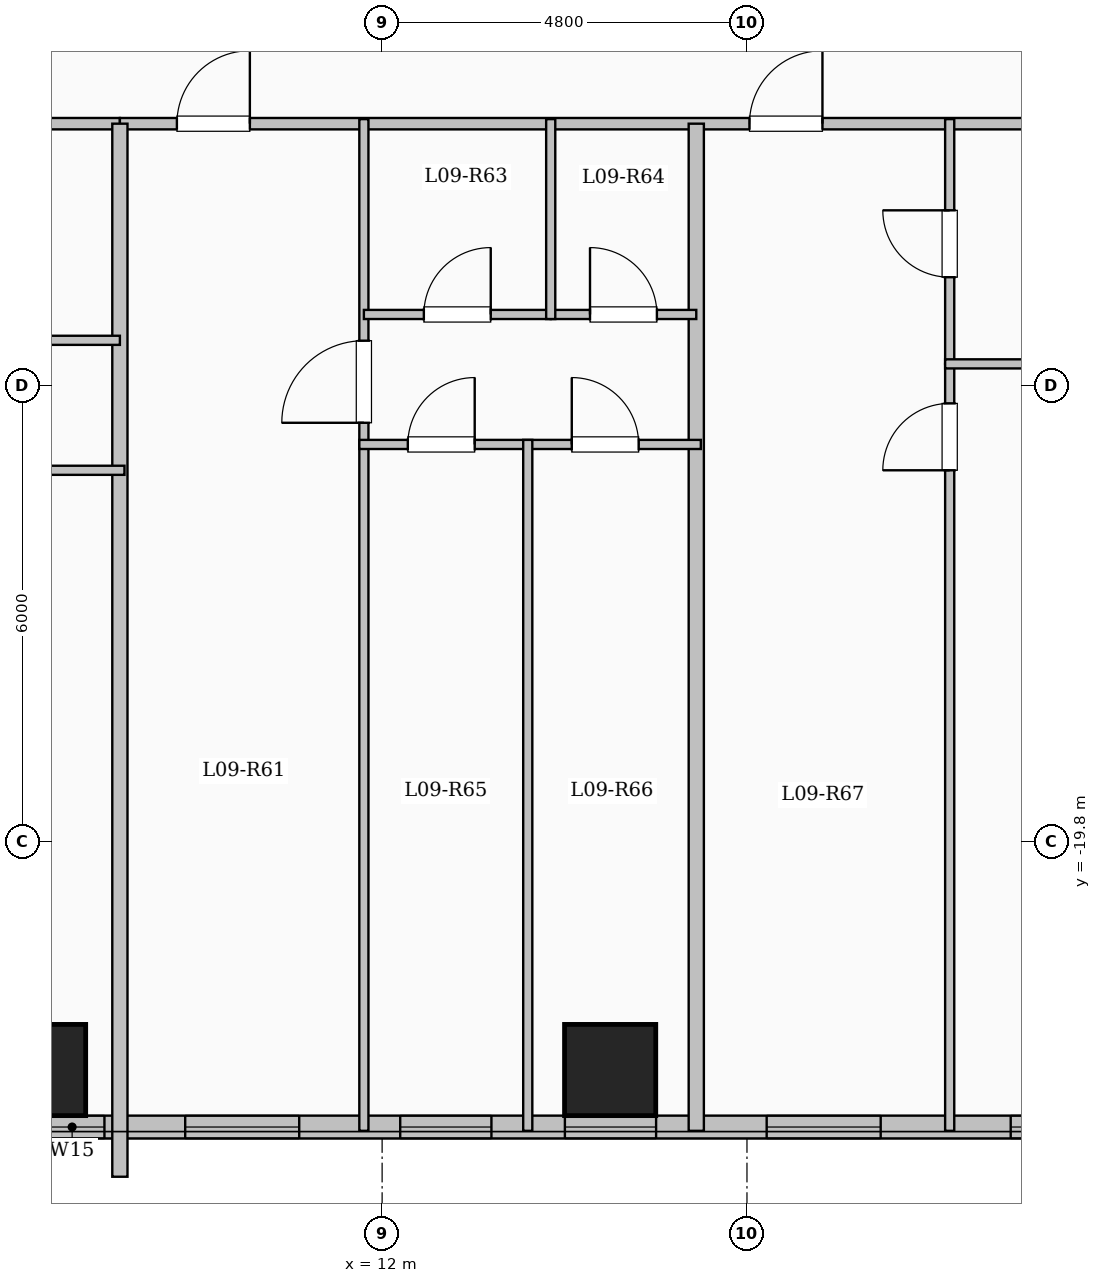
"""IFC4 building model, lengths in metres.
Left out: names, types, materials, properties, quantities, classifications, styles, units other than length and angle.
Written with IfcOpenShell. Run it as: python <this file> out.ifc"""

import sys

from ifc_helpers import new_model, si_unit, direction, frame, frame_2d, origin, origin_2d, place, context, subcontext, project, spatial, rectangle, extrude, element, fill, save


model = new_model("IFC4")
c1 = context("Model", 3, precision=1e-05, world=origin(), true_north=direction((0.0, 1.0)))
c2 = subcontext(c1, "Body", "Model", "MODEL_VIEW")
j1 = project(units=[si_unit("LENGTHUNIT", "METRE"), si_unit("PLANEANGLEUNIT", "RADIAN")], contexts=[c1])
p1 = place(None, origin())
s1 = spatial("IfcSite", under=j1, at=p1, CompositionType="ELEMENT")
p2 = place(p1, origin())
s2 = spatial("IfcBuilding", under=s1, at=p2, CompositionType="ELEMENT")
p3 = place(p2, frame((0.0, 0.0, 37.4)))
s3 = spatial("IfcBuildingStorey", under=s2, at=p3, CompositionType="ELEMENT", Elevation=37.4)
for number, where, z_axis, x_axis in (
    (1, (7.5, -22.8, 0.0), (0.0, 0.0, 1.0), (1.0, 0.0, 0.0)),
    (2, (15.0, -22.8, 0.0), (0.0, 0.0, 1.0), (1.0, 0.0, 0.0)),
):
    element("IfcColumn", number, at=place(p3, frame(where, z_axis=z_axis, x_axis=x_axis)), inside=s3, PredefinedType="COLUMN", context=c2, shape_type="SweptSolid", body=[
        extrude(rectangle(XDim=1.2, YDim=1.2, at=origin_2d()), origin(), (0.0, 0.0, 1.0), 3.35),
    ])
p4 = place(p3, frame((22.65, -23.55, 0.0), z_axis=(0.0, 0.0, 1.0), x_axis=(-1.0, 0.0, 0.0)))
e3 = element("IfcWall", 3, at=p4, inside=s3, PredefinedType="SOLIDWALL", context=c2, shape_type="SweptSolid", body=[
    extrude(rectangle(XDim=15.3, YDim=0.3, at=frame_2d((7.65, 0.0))), origin(), (0.0, 0.0, 1.0), 3.1),
])
p5 = place(p4, frame((0.88, 0.0, 0.9)))
e4 = element("IfcOpeningElement", 4, at=p5, cuts=e3, PredefinedType="OPENING", context=c2, shape_type="SweptSolid", body=[
    extrude(rectangle(XDim=1.5, YDim=1.65, at=frame_2d((0.75, 0.825))), frame((0.0, 0.16, 0.0), z_axis=(0.0, -1.0, 0.0), x_axis=(1.0, 0.0, 0.0)), (0.0, 0.0, 1.0), 0.32),
])
p6 = place(p4, frame((4.091, 0.0, 0.9)))
e5 = element("IfcOpeningElement", 5, at=p6, cuts=e3, PredefinedType="OPENING", context=c2, shape_type="SweptSolid", body=[
    extrude(rectangle(XDim=1.5, YDim=1.65, at=frame_2d((0.75, 0.825))), frame((0.0, 0.16, 0.0), z_axis=(0.0, -1.0, 0.0), x_axis=(1.0, 0.0, 0.0)), (0.0, 0.0, 1.0), 0.32),
])
p7 = place(p4, frame((7.045, 0.0, 0.95)))
e6 = element("IfcOpeningElement", 6, at=p7, cuts=e3, PredefinedType="OPENING", context=c2, shape_type="SweptSolid", body=[
    extrude(rectangle(XDim=1.2, YDim=1.5, at=frame_2d((0.6, 0.75))), frame((0.0, 0.16, 0.0), z_axis=(0.0, -1.0, 0.0), x_axis=(1.0, 0.0, 0.0)), (0.0, 0.0, 1.0), 0.32),
])
p8 = place(p4, frame((9.212, 0.0, 0.95)))
e7 = element("IfcOpeningElement", 7, at=p8, cuts=e3, PredefinedType="OPENING", context=c2, shape_type="SweptSolid", body=[
    extrude(rectangle(XDim=1.2, YDim=1.5, at=frame_2d((0.6, 0.75))), frame((0.0, 0.16, 0.0), z_axis=(0.0, -1.0, 0.0), x_axis=(1.0, 0.0, 0.0)), (0.0, 0.0, 1.0), 0.32),
])
p9 = place(p4, frame((11.741, 0.0, 0.9)))
e8 = element("IfcOpeningElement", 8, at=p9, cuts=e3, PredefinedType="OPENING", context=c2, shape_type="SweptSolid", body=[
    extrude(rectangle(XDim=1.5, YDim=1.65, at=frame_2d((0.75, 0.825))), frame((0.0, 0.16, 0.0), z_axis=(0.0, -1.0, 0.0), x_axis=(1.0, 0.0, 0.0)), (0.0, 0.0, 1.0), 0.32),
])
p10 = place(p4, frame((14.303, 0.0, 0.95)))
e9 = element("IfcOpeningElement", 9, at=p10, cuts=e3, PredefinedType="OPENING", context=c2, shape_type="SweptSolid", body=[
    extrude(rectangle(XDim=0.85, YDim=1.5, at=frame_2d((0.425, 0.75))), frame((0.0, 0.16, 0.0), z_axis=(0.0, -1.0, 0.0), x_axis=(1.0, 0.0, 0.0)), (0.0, 0.0, 1.0), 0.32),
])
p11 = place(p3, frame((-8.55, -10.35, 0.0), z_axis=(0.0, 0.0, 1.0), x_axis=(1.0, 0.0, 0.0)))
e10 = element("IfcWall", 10, at=p11, inside=s3, PredefinedType="PARTITIONING", context=c2, shape_type="SweptSolid", body=[
    extrude(rectangle(XDim=17.1, YDim=0.15, at=frame_2d((8.55, 0.0))), origin(), (0.0, 0.0, 1.0), 3.1),
])
p12 = place(p11, frame((0.8, 0.0, 0.0)))
e11 = element("IfcOpeningElement", 11, at=p12, cuts=e10, PredefinedType="OPENING", context=c2, shape_type="SweptSolid", body=[
    extrude(rectangle(XDim=0.96, YDim=2.15, at=frame_2d((0.48, 1.075))), frame((0.0, 0.085, 0.0), z_axis=(0.0, -1.0, 0.0), x_axis=(1.0, 0.0, 0.0)), (0.0, 0.0, 1.0), 0.17),
])
p13 = place(p3, frame((8.55, -10.35, 0.0), z_axis=(0.0, 0.0, 1.0), x_axis=(1.0, 0.0, 0.0)))
e12 = element("IfcWall", 12, at=p13, inside=s3, PredefinedType="PARTITIONING", context=c2, shape_type="SweptSolid", body=[
    extrude(rectangle(XDim=14.0, YDim=0.15, at=frame_2d((7.0, 0.0))), origin(), (0.0, 0.0, 1.0), 3.1),
])
p14 = place(p13, frame((0.75, 0.0, 0.0)))
e13 = element("IfcOpeningElement", 13, at=p14, cuts=e12, PredefinedType="OPENING", context=c2, shape_type="SweptSolid", body=[
    extrude(rectangle(XDim=0.96, YDim=2.15, at=frame_2d((0.48, 1.075))), frame((0.0, 0.085, 0.0), z_axis=(0.0, -1.0, 0.0), x_axis=(1.0, 0.0, 0.0)), (0.0, 0.0, 1.0), 0.17),
])
p15 = place(p13, frame((8.283, 0.0, 0.0)))
e14 = element("IfcOpeningElement", 14, at=p15, cuts=e12, PredefinedType="OPENING", context=c2, shape_type="SweptSolid", body=[
    extrude(rectangle(XDim=0.96, YDim=2.15, at=frame_2d((0.48, 1.075))), frame((0.0, 0.085, 0.0), z_axis=(0.0, -1.0, 0.0), x_axis=(1.0, 0.0, 0.0)), (0.0, 0.0, 1.0), 0.17),
])
p16 = place(p3, frame((16.133, -23.6, 0.0), z_axis=(0.0, 0.0, 1.0), x_axis=(0.0, 1.0, 0.0)))
e15 = element("IfcWall", 15, at=p16, inside=s3, PredefinedType="SOLIDWALL", context=c2, shape_type="SweptSolid", body=[
    extrude(rectangle(XDim=13.25, YDim=0.2, at=frame_2d((6.625, 0.0))), origin(), (0.0, 0.0, 1.0), 3.1),
])
p17 = place(p3, frame((11.76, -23.6, 0.0), z_axis=(0.0, 0.0, 1.0), x_axis=(0.0, 1.0, 0.0)))
e16 = element("IfcWall", 16, at=p17, inside=s3, PredefinedType="PARTITIONING", context=c2, shape_type="SweptSolid", body=[
    extrude(rectangle(XDim=13.31, YDim=0.12, at=frame_2d((6.655, 0.0))), origin(), (0.0, 0.0, 1.0), 3.1),
])
p18 = place(p17, frame((9.315, 0.0, 0.0)))
e17 = element("IfcOpeningElement", 17, at=p18, cuts=e16, PredefinedType="OPENING", context=c2, shape_type="SweptSolid", body=[
    extrude(rectangle(XDim=1.08, YDim=2.15, at=frame_2d((0.54, 1.075))), frame((0.0, 0.07, 0.0), z_axis=(0.0, -1.0, 0.0), x_axis=(1.0, 0.0, 0.0)), (0.0, 0.0, 1.0), 0.14),
])
p19 = place(p3, frame((11.76, -12.86, 0.0), z_axis=(0.0, 0.0, 1.0), x_axis=(1.0, 0.0, 0.0)))
e18 = element("IfcWall", 18, at=p19, inside=s3, PredefinedType="PARTITIONING", context=c2, shape_type="SweptSolid", body=[
    extrude(rectangle(XDim=2.458, YDim=0.12, at=frame_2d((1.229, 0.0))), origin(), (0.0, 0.0, 1.0), 2.585),
])
p20 = place(p19, frame((0.789, 0.0, 0.0)))
e19 = element("IfcOpeningElement", 19, at=p20, cuts=e18, PredefinedType="OPENING", context=c2, shape_type="SweptSolid", body=[
    extrude(rectangle(XDim=0.88, YDim=2.1, at=frame_2d((0.44, 1.05))), frame((0.0, 0.07, 0.0), z_axis=(0.0, -1.0, 0.0), x_axis=(1.0, 0.0, 0.0)), (0.0, 0.0, 1.0), 0.14),
])
p21 = place(p3, frame((14.218, -12.86, 0.0), z_axis=(0.0, 0.0, 1.0), x_axis=(1.0, 0.0, 0.0)))
e20 = element("IfcWall", 20, at=p21, inside=s3, PredefinedType="PARTITIONING", context=c2, shape_type="SweptSolid", body=[
    extrude(rectangle(XDim=1.915, YDim=0.12, at=frame_2d((0.958, 0.0))), origin(), (0.0, 0.0, 1.0), 2.585),
])
p22 = place(p21, frame((0.517, 0.0, 0.0)))
e21 = element("IfcOpeningElement", 21, at=p22, cuts=e20, PredefinedType="OPENING", context=c2, shape_type="SweptSolid", body=[
    extrude(rectangle(XDim=0.88, YDim=2.1, at=frame_2d((0.44, 1.05))), frame((0.0, 0.07, 0.0), z_axis=(0.0, -1.0, 0.0), x_axis=(1.0, 0.0, 0.0)), (0.0, 0.0, 1.0), 0.14),
])
p23 = place(p3, frame((11.7, -14.57, 0.0), z_axis=(0.0, 0.0, 1.0), x_axis=(1.0, 0.0, 0.0)))
e22 = element("IfcWall", 22, at=p23, inside=s3, PredefinedType="PARTITIONING", context=c2, shape_type="SweptSolid", body=[
    extrude(rectangle(XDim=4.493, YDim=0.12, at=frame_2d((2.247, 0.0))), origin(), (0.0, 0.0, 1.0), 3.1),
])
p24 = place(p23, frame((0.638, 0.0, 0.0)))
e23 = element("IfcOpeningElement", 23, at=p24, cuts=e22, PredefinedType="OPENING", context=c2, shape_type="SweptSolid", body=[
    extrude(rectangle(XDim=0.88, YDim=2.1, at=frame_2d((0.44, 1.05))), frame((0.0, 0.07, 0.0), z_axis=(0.0, -1.0, 0.0), x_axis=(1.0, 0.0, 0.0)), (0.0, 0.0, 1.0), 0.14),
])
p25 = place(p23, frame((2.795, 0.0, 0.0)))
e24 = element("IfcOpeningElement", 24, at=p25, cuts=e22, PredefinedType="OPENING", context=c2, shape_type="SweptSolid", body=[
    extrude(rectangle(XDim=0.88, YDim=2.1, at=frame_2d((0.44, 1.05))), frame((0.0, 0.07, 0.0), z_axis=(0.0, -1.0, 0.0), x_axis=(1.0, 0.0, 0.0)), (0.0, 0.0, 1.0), 0.14),
])
p26 = place(p3, frame((14.218, -12.92, 0.0), z_axis=(0.0, 0.0, 1.0), x_axis=(0.0, 1.0, 0.0)))
e25 = element("IfcWall", 25, at=p26, inside=s3, PredefinedType="PARTITIONING", context=c2, shape_type="SweptSolid", body=[
    extrude(rectangle(XDim=2.63, YDim=0.12, at=frame_2d((1.315, 0.0))), origin(), (0.0, 0.0, 1.0), 3.1),
])
p27 = place(p3, frame((13.916, -23.6, 0.0), z_axis=(0.0, 0.0, 1.0), x_axis=(0.0, 1.0, 0.0)))
e26 = element("IfcWall", 26, at=p27, inside=s3, PredefinedType="PARTITIONING", context=c2, shape_type="SweptSolid", body=[
    extrude(rectangle(XDim=9.09, YDim=0.12, at=frame_2d((4.545, 0.0))), origin(), (0.0, 0.0, 1.0), 3.1),
])
p28 = place(p3, frame((19.467, -23.6, 0.0), z_axis=(0.0, 0.0, 1.0), x_axis=(0.0, 1.0, 0.0)))
e27 = element("IfcWall", 27, at=p28, inside=s3, PredefinedType="PARTITIONING", context=c2, shape_type="SweptSolid", body=[
    extrude(rectangle(XDim=10.09, YDim=0.12, at=frame_2d((5.045, 0.0))), origin(), (0.0, 0.0, 1.0), 3.1),
])
p29 = place(p28, frame((8.69, 0.0, 0.0)))
e28 = element("IfcOpeningElement", 28, at=p29, cuts=e27, PredefinedType="OPENING", context=c2, shape_type="SweptSolid", body=[
    extrude(rectangle(XDim=0.88, YDim=2.1, at=frame_2d((0.44, 1.05))), frame((0.0, 0.07, 0.0), z_axis=(0.0, -1.0, 0.0), x_axis=(1.0, 0.0, 0.0)), (0.0, 0.0, 1.0), 0.14),
])
p30 = place(p3, frame((19.467, -13.51, 0.0), z_axis=(0.0, 0.0, 1.0), x_axis=(0.0, 1.0, 0.0)))
e29 = element("IfcWall", 29, at=p30, inside=s3, PredefinedType="PARTITIONING", context=c2, shape_type="SweptSolid", body=[
    extrude(rectangle(XDim=3.22, YDim=0.12, at=frame_2d((1.61, 0.0))), origin(), (0.0, 0.0, 1.0), 3.1),
])
p31 = place(p30, frame((1.14, 0.0, 0.0)))
e30 = element("IfcOpeningElement", 30, at=p31, cuts=e29, PredefinedType="OPENING", context=c2, shape_type="SweptSolid", body=[
    extrude(rectangle(XDim=0.88, YDim=2.1, at=frame_2d((0.44, 1.05))), frame((0.0, 0.07, 0.0), z_axis=(0.0, -1.0, 0.0), x_axis=(1.0, 0.0, 0.0)), (0.0, 0.0, 1.0), 0.14),
])
p32 = place(p3, frame((19.407, -13.51, 0.0), z_axis=(0.0, 0.0, 1.0), x_axis=(1.0, 0.0, 0.0)))
e31 = element("IfcWall", 31, at=p32, inside=s3, PredefinedType="PARTITIONING", context=c2, shape_type="SweptSolid", body=[
    extrude(rectangle(XDim=3.203, YDim=0.12, at=frame_2d((1.602, 0.0))), origin(), (0.0, 0.0, 1.0), 3.1),
])
p33 = place(p3, frame((8.55, -24.204, 0.0), z_axis=(0.0, 0.0, 1.0), x_axis=(0.0, 1.0, 0.0)))
e32 = element("IfcWall", 32, at=p33, inside=s3, PredefinedType="SOLIDWALL", context=c2, shape_type="SweptSolid", body=[
    extrude(rectangle(XDim=13.854, YDim=0.2, at=frame_2d((6.927, 0.0))), origin(), (0.0, 0.0, 1.0), 3.1),
])
p34 = place(p3, frame((3.223, -13.2, 0.0), z_axis=(0.0, 0.0, 1.0), x_axis=(1.0, 0.0, 0.0)))
e33 = element("IfcWall", 33, at=p34, inside=s3, PredefinedType="PARTITIONING", context=c2, shape_type="SweptSolid", body=[
    extrude(rectangle(XDim=5.327, YDim=0.12, at=frame_2d((2.664, 0.0))), origin(), (0.0, 0.0, 1.0), 3.1),
])
p35 = place(p34, frame((2.224, 0.0, 0.0)))
e34 = element("IfcOpeningElement", 34, at=p35, cuts=e33, PredefinedType="OPENING", context=c2, shape_type="SweptSolid", body=[
    extrude(rectangle(XDim=0.88, YDim=2.1, at=frame_2d((0.44, 1.05))), frame((0.0, 0.07, 0.0), z_axis=(0.0, -1.0, 0.0), x_axis=(1.0, 0.0, 0.0)), (0.0, 0.0, 1.0), 0.14),
])
p36 = place(p3, frame((-2.777, -14.91, 0.0), z_axis=(0.0, 0.0, 1.0), x_axis=(1.0, 0.0, 0.0)))
e35 = element("IfcWall", 35, at=p36, inside=s3, PredefinedType="PARTITIONING", context=c2, shape_type="SweptSolid", body=[
    extrude(rectangle(XDim=11.387, YDim=0.12, at=frame_2d((5.694, 0.0))), origin(), (0.0, 0.0, 1.0), 2.585),
])
p37 = place(p36, frame((1.428, 0.0, 0.0)))
e36 = element("IfcOpeningElement", 36, at=p37, cuts=e35, PredefinedType="OPENING", context=c2, shape_type="SweptSolid", body=[
    extrude(rectangle(XDim=0.88, YDim=2.1, at=frame_2d((0.44, 1.05))), frame((0.0, 0.07, 0.0), z_axis=(0.0, -1.0, 0.0), x_axis=(1.0, 0.0, 0.0)), (0.0, 0.0, 1.0), 0.14),
])
p38 = place(p36, frame((5.164, 0.0, 0.0)))
e37 = element("IfcOpeningElement", 37, at=p38, cuts=e35, PredefinedType="OPENING", context=c2, shape_type="SweptSolid", body=[
    extrude(rectangle(XDim=0.88, YDim=2.1, at=frame_2d((0.44, 1.05))), frame((0.0, 0.07, 0.0), z_axis=(0.0, -1.0, 0.0), x_axis=(1.0, 0.0, 0.0)), (0.0, 0.0, 1.0), 0.14),
])
p39 = place(p36, frame((8.899, 0.0, 0.0)))
e38 = element("IfcOpeningElement", 38, at=p39, cuts=e35, PredefinedType="OPENING", context=c2, shape_type="SweptSolid", body=[
    extrude(rectangle(XDim=0.88, YDim=2.1, at=frame_2d((0.44, 1.05))), frame((0.0, 0.07, 0.0), z_axis=(0.0, -1.0, 0.0), x_axis=(1.0, 0.0, 0.0)), (0.0, 0.0, 1.0), 0.14),
])
p40 = place(p5, origin())
e39 = element("IfcWindow", 39, at=p40, inside=s3, PartitioningType="SINGLE_PANEL", PredefinedType="WINDOW", context=c2, shape_type="SweptSolid", body=[
    extrude(rectangle(XDim=1.5, YDim=1.65, at=frame_2d((0.75, 0.825))), frame((0.0, 0.03, 0.0), z_axis=(0.0, -1.0, 0.0), x_axis=(1.0, 0.0, 0.0)), (0.0, 0.0, 1.0), 0.06),
])
fill(e4, e39)
p41 = place(p6, origin())
e40 = element("IfcWindow", 40, at=p41, inside=s3, PartitioningType="SINGLE_PANEL", PredefinedType="WINDOW", context=c2, shape_type="SweptSolid", body=[
    extrude(rectangle(XDim=1.5, YDim=1.65, at=frame_2d((0.75, 0.825))), frame((0.0, 0.03, 0.0), z_axis=(0.0, -1.0, 0.0), x_axis=(1.0, 0.0, 0.0)), (0.0, 0.0, 1.0), 0.06),
])
fill(e5, e40)
p42 = place(p7, origin())
e41 = element("IfcWindow", 41, at=p42, inside=s3, PartitioningType="SINGLE_PANEL", PredefinedType="WINDOW", context=c2, shape_type="SweptSolid", body=[
    extrude(rectangle(XDim=1.2, YDim=1.5, at=frame_2d((0.6, 0.75))), frame((0.0, 0.03, 0.0), z_axis=(0.0, -1.0, 0.0), x_axis=(1.0, 0.0, 0.0)), (0.0, 0.0, 1.0), 0.06),
])
fill(e6, e41)
p43 = place(p8, origin())
e42 = element("IfcWindow", 42, at=p43, inside=s3, PartitioningType="SINGLE_PANEL", PredefinedType="WINDOW", context=c2, shape_type="SweptSolid", body=[
    extrude(rectangle(XDim=1.2, YDim=1.5, at=frame_2d((0.6, 0.75))), frame((0.0, 0.03, 0.0), z_axis=(0.0, -1.0, 0.0), x_axis=(1.0, 0.0, 0.0)), (0.0, 0.0, 1.0), 0.06),
])
fill(e7, e42)
p44 = place(p9, origin())
e43 = element("IfcWindow", 43, at=p44, inside=s3, PartitioningType="SINGLE_PANEL", PredefinedType="WINDOW", context=c2, shape_type="SweptSolid", body=[
    extrude(rectangle(XDim=1.5, YDim=1.65, at=frame_2d((0.75, 0.825))), frame((0.0, 0.03, 0.0), z_axis=(0.0, -1.0, 0.0), x_axis=(1.0, 0.0, 0.0)), (0.0, 0.0, 1.0), 0.06),
])
fill(e8, e43)
p45 = place(p10, origin())
e44 = element("IfcWindow", 44, at=p45, inside=s3, PartitioningType="SINGLE_PANEL", PredefinedType="WINDOW", context=c2, shape_type="SweptSolid", body=[
    extrude(rectangle(XDim=0.85, YDim=1.5, at=frame_2d((0.425, 0.75))), frame((0.0, 0.03, 0.0), z_axis=(0.0, -1.0, 0.0), x_axis=(1.0, 0.0, 0.0)), (0.0, 0.0, 1.0), 0.06),
])
fill(e9, e44)
p46 = place(p14, origin())
e45 = element("IfcDoor", 45, at=p46, inside=s3, OperationType="SINGLE_SWING_RIGHT", PredefinedType="DOOR", context=c2, shape_type="SweptSolid", body=[
    extrude(rectangle(XDim=0.96, YDim=2.15, at=frame_2d((0.48, 1.075))), frame((0.0, 0.025, 0.0), z_axis=(0.0, -1.0, 0.0), x_axis=(1.0, 0.0, 0.0)), (0.0, 0.0, 1.0), 0.05),
])
fill(e13, e45)
p47 = place(p18, origin())
e46 = element("IfcDoor", 46, at=p47, inside=s3, OperationType="SINGLE_SWING_LEFT", PredefinedType="DOOR", context=c2, shape_type="SweptSolid", body=[
    extrude(rectangle(XDim=1.08, YDim=2.15, at=frame_2d((0.54, 1.075))), frame((0.0, 0.025, 0.0), z_axis=(0.0, -1.0, 0.0), x_axis=(1.0, 0.0, 0.0)), (0.0, 0.0, 1.0), 0.05),
])
fill(e17, e46)
p48 = place(p20, origin())
e47 = element("IfcDoor", 47, at=p48, inside=s3, OperationType="SINGLE_SWING_RIGHT", PredefinedType="DOOR", context=c2, shape_type="SweptSolid", body=[
    extrude(rectangle(XDim=0.88, YDim=2.1, at=frame_2d((0.44, 1.05))), frame((0.0, 0.025, 0.0), z_axis=(0.0, -1.0, 0.0), x_axis=(1.0, 0.0, 0.0)), (0.0, 0.0, 1.0), 0.05),
])
fill(e19, e47)
p49 = place(p22, origin())
e48 = element("IfcDoor", 48, at=p49, inside=s3, OperationType="SINGLE_SWING_LEFT", PredefinedType="DOOR", context=c2, shape_type="SweptSolid", body=[
    extrude(rectangle(XDim=0.88, YDim=2.1, at=frame_2d((0.44, 1.05))), frame((0.0, 0.025, 0.0), z_axis=(0.0, -1.0, 0.0), x_axis=(1.0, 0.0, 0.0)), (0.0, 0.0, 1.0), 0.05),
])
fill(e21, e48)
p50 = place(p24, origin())
e49 = element("IfcDoor", 49, at=p50, inside=s3, OperationType="SINGLE_SWING_RIGHT", PredefinedType="DOOR", context=c2, shape_type="SweptSolid", body=[
    extrude(rectangle(XDim=0.88, YDim=2.1, at=frame_2d((0.44, 1.05))), frame((0.0, 0.025, 0.0), z_axis=(0.0, -1.0, 0.0), x_axis=(1.0, 0.0, 0.0)), (0.0, 0.0, 1.0), 0.05),
])
fill(e23, e49)
p51 = place(p25, origin())
e50 = element("IfcDoor", 50, at=p51, inside=s3, OperationType="SINGLE_SWING_LEFT", PredefinedType="DOOR", context=c2, shape_type="SweptSolid", body=[
    extrude(rectangle(XDim=0.88, YDim=2.1, at=frame_2d((0.44, 1.05))), frame((0.0, 0.025, 0.0), z_axis=(0.0, -1.0, 0.0), x_axis=(1.0, 0.0, 0.0)), (0.0, 0.0, 1.0), 0.05),
])
fill(e24, e50)
p52 = place(p15, origin())
e51 = element("IfcDoor", 51, at=p52, inside=s3, OperationType="SINGLE_SWING_RIGHT", PredefinedType="DOOR", context=c2, shape_type="SweptSolid", body=[
    extrude(rectangle(XDim=0.96, YDim=2.15, at=frame_2d((0.48, 1.075))), frame((0.0, 0.025, 0.0), z_axis=(0.0, -1.0, 0.0), x_axis=(1.0, 0.0, 0.0)), (0.0, 0.0, 1.0), 0.05),
])
fill(e14, e51)
p53 = place(p29, origin())
e52 = element("IfcDoor", 52, at=p53, inside=s3, OperationType="SINGLE_SWING_LEFT", PredefinedType="DOOR", context=c2, shape_type="SweptSolid", body=[
    extrude(rectangle(XDim=0.88, YDim=2.1, at=frame_2d((0.44, 1.05))), frame((0.0, 0.025, 0.0), z_axis=(0.0, -1.0, 0.0), x_axis=(1.0, 0.0, 0.0)), (0.0, 0.0, 1.0), 0.05),
])
fill(e28, e52)
p54 = place(p31, origin())
e53 = element("IfcDoor", 53, at=p54, inside=s3, OperationType="SINGLE_SWING_RIGHT", PredefinedType="DOOR", context=c2, shape_type="SweptSolid", body=[
    extrude(rectangle(XDim=0.88, YDim=2.1, at=frame_2d((0.44, 1.05))), frame((0.0, 0.025, 0.0), z_axis=(0.0, -1.0, 0.0), x_axis=(1.0, 0.0, 0.0)), (0.0, 0.0, 1.0), 0.05),
])
fill(e30, e53)
save(model, sys.argv[1])
